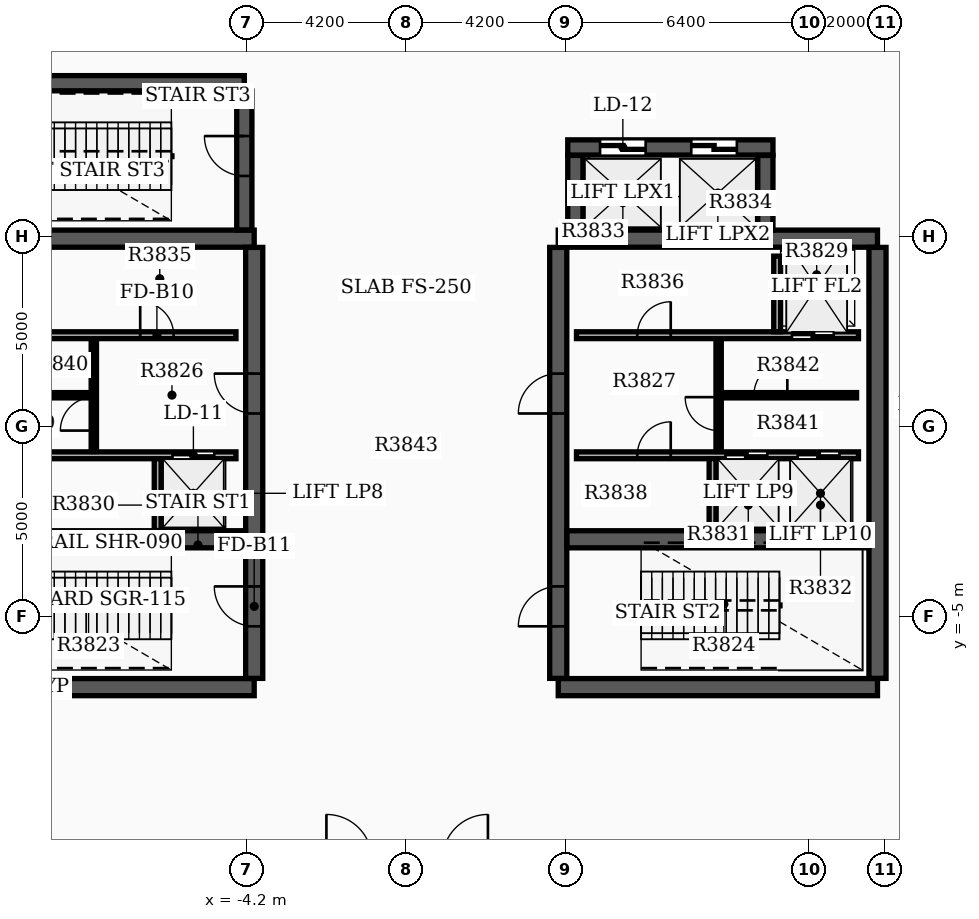
"""IFC4 building model, lengths in metres.
Left out: names, types, materials, properties, quantities, classifications, styles, units other than length and angle.
Written with IfcOpenShell. Run it as: python <this file> out.ifc"""

import sys

from ifc_helpers import new_model, si_unit, direction, frame, frame_2d, origin, place, context, subcontext, project, spatial, rectangle, extrude, element, fill, save


model = new_model("IFC4")
c1 = context("Model", 3, precision=1e-05, world=origin(), true_north=direction((0.0, 1.0)))
c2 = subcontext(c1, "Body", "Model", "MODEL_VIEW")
j1 = project(units=[si_unit("LENGTHUNIT", "METRE"), si_unit("PLANEANGLEUNIT", "RADIAN")], contexts=[c1])
p1 = place(None, origin())
s1 = spatial("IfcSite", under=j1, at=p1, CompositionType="ELEMENT")
p2 = place(p1, origin())
s2 = spatial("IfcBuilding", under=s1, at=p2, CompositionType="ELEMENT")
p3 = place(p2, frame((0.0, 0.0, 240.3)))
s3 = spatial("IfcBuildingStorey", under=s2, at=p3, CompositionType="ELEMENT", Elevation=240.3)
for number, where, z_axis, x_axis in (
    (1, (-12.4, -6.85, 0.0), (0.0, 0.0, 1.0), (1.0, 0.0, 0.0)),
    (2, (-12.4, 4.95, 0.0), (0.0, 0.0, 1.0), (1.0, 0.0, 0.0)),
):
    element("IfcWall", number, at=place(p3, frame(where, z_axis=z_axis, x_axis=x_axis)), inside=s3, PredefinedType="SHEAR", context=c2, shape_type="SweptSolid", body=[
        extrude(rectangle(XDim=8.4, YDim=0.45, at=frame_2d((4.2, 0.0))), origin(), (0.0, 0.0, 1.0), 4.85),
    ])
p4 = place(p3, frame((-4.0, -6.62, 0.0), z_axis=(0.0, 0.0, 1.0), x_axis=(0.0, 1.0, 0.0)))
e3 = element("IfcWall", 3, at=p4, inside=s3, PredefinedType="SHEAR", context=c2, shape_type="SweptSolid", body=[
    extrude(rectangle(XDim=11.34, YDim=0.45, at=frame_2d((5.67, 0.0))), origin(), (0.0, 0.0, 1.0), 4.85),
])
p5 = place(p4, frame((1.37, 0.0, 0.0)))
e4 = element("IfcOpeningElement", 4, at=p5, cuts=e3, PredefinedType="OPENING", context=c2, shape_type="SweptSolid", body=[
    extrude(rectangle(XDim=1.05, YDim=2.15, at=frame_2d((0.525, 1.075))), frame((0.0, 0.235, 0.0), z_axis=(0.0, -1.0, 0.0), x_axis=(1.0, 0.0, 0.0)), (0.0, 0.0, 1.0), 0.47),
])
p6 = place(p4, frame((6.97, 0.0, 0.0)))
e5 = element("IfcOpeningElement", 5, at=p6, cuts=e3, PredefinedType="OPENING", context=c2, shape_type="SweptSolid", body=[
    extrude(rectangle(XDim=1.05, YDim=2.15, at=frame_2d((0.525, 1.075))), frame((0.0, 0.235, 0.0), z_axis=(0.0, -1.0, 0.0), x_axis=(1.0, 0.0, 0.0)), (0.0, 0.0, 1.0), 0.47),
])
p7 = place(p3, frame((-12.17, -2.96, 0.0), z_axis=(0.0, 0.0, 1.0), x_axis=(1.0, 0.0, 0.0)))
e6 = element("IfcWall", 6, at=p7, inside=s3, PredefinedType="SHEAR", context=c2, shape_type="SweptSolid", body=[
    extrude(rectangle(XDim=7.94, YDim=0.45, at=frame_2d((3.97, 0.0))), origin(), (0.0, 0.0, 1.0), 4.85),
])
for number, where, z_axis, x_axis in (
    (7, (4.0, -6.85, 0.0), (0.0, 0.0, 1.0), (1.0, 0.0, 0.0)),
    (8, (4.0, 4.95, 0.0), (0.0, 0.0, 1.0), (1.0, 0.0, 0.0)),
):
    element("IfcWall", number, at=place(p3, frame(where, z_axis=z_axis, x_axis=x_axis)), inside=s3, PredefinedType="SHEAR", context=c2, shape_type="SweptSolid", body=[
        extrude(rectangle(XDim=8.4, YDim=0.45, at=frame_2d((4.2, 0.0))), origin(), (0.0, 0.0, 1.0), 4.85),
    ])
p8 = place(p3, frame((4.0, -6.62, 0.0), z_axis=(0.0, 0.0, 1.0), x_axis=(0.0, 1.0, 0.0)))
e9 = element("IfcWall", 9, at=p8, inside=s3, PredefinedType="SHEAR", context=c2, shape_type="SweptSolid", body=[
    extrude(rectangle(XDim=11.34, YDim=0.45, at=frame_2d((5.67, 0.0))), origin(), (0.0, 0.0, 1.0), 4.85),
])
p9 = place(p8, frame((1.37, 0.0, 0.0)))
e10 = element("IfcOpeningElement", 10, at=p9, cuts=e9, PredefinedType="OPENING", context=c2, shape_type="SweptSolid", body=[
    extrude(rectangle(XDim=1.05, YDim=2.15, at=frame_2d((0.525, 1.075))), frame((0.0, 0.235, 0.0), z_axis=(0.0, -1.0, 0.0), x_axis=(1.0, 0.0, 0.0)), (0.0, 0.0, 1.0), 0.47),
])
p10 = place(p8, frame((6.97, 0.0, 0.0)))
e11 = element("IfcOpeningElement", 11, at=p10, cuts=e9, PredefinedType="OPENING", context=c2, shape_type="SweptSolid", body=[
    extrude(rectangle(XDim=1.05, YDim=2.15, at=frame_2d((0.525, 1.075))), frame((0.0, 0.235, 0.0), z_axis=(0.0, -1.0, 0.0), x_axis=(1.0, 0.0, 0.0)), (0.0, 0.0, 1.0), 0.47),
])
p11 = place(p3, frame((12.4, -6.62, 0.0), z_axis=(0.0, 0.0, 1.0), x_axis=(0.0, 1.0, 0.0)))
e12 = element("IfcWall", 12, at=p11, inside=s3, PredefinedType="SHEAR", context=c2, shape_type="SweptSolid", body=[
    extrude(rectangle(XDim=11.34, YDim=0.45, at=frame_2d((5.67, 0.0))), origin(), (0.0, 0.0, 1.0), 4.85),
])
p12 = place(p3, frame((4.23, -2.96, 0.0), z_axis=(0.0, 0.0, 1.0), x_axis=(1.0, 0.0, 0.0)))
e13 = element("IfcWall", 13, at=p12, inside=s3, PredefinedType="SHEAR", context=c2, shape_type="SweptSolid", body=[
    extrude(rectangle(XDim=7.94, YDim=0.45, at=frame_2d((3.97, 0.0))), origin(), (0.0, 0.0, 1.0), 4.85),
])
p13 = place(p3, frame((-12.22, 9.04, 0.0), z_axis=(0.0, 0.0, 1.0), x_axis=(1.0, 0.0, 0.0)))
e14 = element("IfcWall", 14, at=p13, inside=s3, PredefinedType="SHEAR", context=c2, shape_type="SweptSolid", body=[
    extrude(rectangle(XDim=7.96, YDim=0.4, at=frame_2d((3.98, 0.0))), origin(), (0.0, 0.0, 1.0), 4.85),
])
p14 = place(p3, frame((-4.26, 5.18, 0.0), z_axis=(0.0, 0.0, 1.0), x_axis=(0.0, 1.0, 0.0)))
e15 = element("IfcWall", 15, at=p14, inside=s3, PredefinedType="SHEAR", context=c2, shape_type="SweptSolid", body=[
    extrude(rectangle(XDim=3.655, YDim=0.4, at=frame_2d((1.828, 0.0))), origin(), (0.0, 0.0, 1.0), 4.85),
])
p15 = place(p14, frame((1.42, 0.0, 0.0)))
e16 = element("IfcOpeningElement", 16, at=p15, cuts=e15, PredefinedType="OPENING", context=c2, shape_type="SweptSolid", body=[
    extrude(rectangle(XDim=1.05, YDim=2.15, at=frame_2d((0.525, 1.075))), frame((0.0, 0.21, 0.0), z_axis=(0.0, -1.0, 0.0), x_axis=(1.0, 0.0, 0.0)), (0.0, 0.0, 1.0), 0.42),
])
p16 = place(p3, frame((4.45, 5.18, 0.0), z_axis=(0.0, 0.0, 1.0), x_axis=(0.0, 1.0, 0.0)))
e17 = element("IfcWall", 17, at=p16, inside=s3, PredefinedType="SHEAR", context=c2, shape_type="SweptSolid", body=[
    extrude(rectangle(XDim=1.96, YDim=0.4, at=frame_2d((0.98, 0.0))), origin(), (0.0, 0.0, 1.0), 4.85),
])
p17 = place(p3, frame((4.25, 7.35, 0.0), z_axis=(0.0, 0.0, 1.0), x_axis=(1.0, 0.0, 0.0)))
e18 = element("IfcWall", 18, at=p17, inside=s3, PredefinedType="SHEAR", context=c2, shape_type="SweptSolid", body=[
    extrude(rectangle(XDim=5.4, YDim=0.4, at=frame_2d((2.7, 0.0))), origin(), (0.0, 0.0, 1.0), 4.85),
])
p18 = place(p17, frame((0.85, 0.0, 0.0)))
e19 = element("IfcOpeningElement", 19, at=p18, cuts=e18, PredefinedType="OPENING", context=c2, shape_type="SweptSolid", body=[
    extrude(rectangle(XDim=1.2, YDim=2.2, at=frame_2d((0.6, 1.1))), frame((0.0, 0.21, 0.0), z_axis=(0.0, -1.0, 0.0), x_axis=(1.0, 0.0, 0.0)), (0.0, 0.0, 1.0), 0.42),
])
p19 = place(p17, frame((3.25, 0.0, 0.0)))
e20 = element("IfcOpeningElement", 20, at=p19, cuts=e18, PredefinedType="OPENING", context=c2, shape_type="SweptSolid", body=[
    extrude(rectangle(XDim=1.2, YDim=2.2, at=frame_2d((0.6, 1.1))), frame((0.0, 0.21, 0.0), z_axis=(0.0, -1.0, 0.0), x_axis=(1.0, 0.0, 0.0)), (0.0, 0.0, 1.0), 0.42),
])
p20 = place(p3, frame((9.45, 5.18, 0.0), z_axis=(0.0, 0.0, 1.0), x_axis=(0.0, 1.0, 0.0)))
e21 = element("IfcWall", 21, at=p20, inside=s3, PredefinedType="SHEAR", context=c2, shape_type="SweptSolid", body=[
    extrude(rectangle(XDim=1.96, YDim=0.4, at=frame_2d((0.98, 0.0))), origin(), (0.0, 0.0, 1.0), 4.85),
])
p21 = place(p3, frame((-11.9, 2.41, 0.0), z_axis=(0.0, 0.0, 1.0), x_axis=(1.0, 0.0, 0.0)))
e22 = element("IfcWall", 22, at=p21, inside=s3, PredefinedType="SOLIDWALL", context=c2, shape_type="SweptSolid", body=[
    extrude(rectangle(XDim=7.42, YDim=0.18, at=frame_2d((3.71, 0.0))), origin(), (0.0, 0.0, 1.0), 3.92),
])
p22 = place(p21, frame((0.55, 0.0, 0.0)))
e23 = element("IfcOpeningElement", 23, at=p22, cuts=e22, PredefinedType="OPENING", context=c2, shape_type="SweptSolid", body=[
    extrude(rectangle(XDim=1.1, YDim=2.15, at=frame_2d((0.55, 1.075))), frame((0.0, 0.1, 0.0), z_axis=(0.0, -1.0, 0.0), x_axis=(1.0, 0.0, 0.0)), (0.0, 0.0, 1.0), 0.2),
])
p23 = place(p21, frame((4.9, 0.0, 0.0)))
e24 = element("IfcOpeningElement", 24, at=p23, cuts=e22, PredefinedType="OPENING", context=c2, shape_type="SweptSolid", body=[
    extrude(rectangle(XDim=0.88, YDim=2.1, at=frame_2d((0.44, 1.05))), frame((0.0, 0.1, 0.0), z_axis=(0.0, -1.0, 0.0), x_axis=(1.0, 0.0, 0.0)), (0.0, 0.0, 1.0), 0.2),
])
p24 = place(p3, frame((4.48, 2.41, 0.0), z_axis=(0.0, 0.0, 1.0), x_axis=(1.0, 0.0, 0.0)))
e25 = element("IfcWall", 25, at=p24, inside=s3, PredefinedType="SOLIDWALL", context=c2, shape_type="SweptSolid", body=[
    extrude(rectangle(XDim=7.42, YDim=0.18, at=frame_2d((3.71, 0.0))), origin(), (0.0, 0.0, 1.0), 3.92),
])
p25 = place(p24, frame((5.67, 0.0, 0.0)))
e26 = element("IfcOpeningElement", 26, at=p25, cuts=e25, PredefinedType="OPENING", context=c2, shape_type="SweptSolid", body=[
    extrude(rectangle(XDim=1.1, YDim=2.15, at=frame_2d((0.55, 1.075))), frame((0.0, 0.1, 0.0), z_axis=(0.0, -1.0, 0.0), x_axis=(1.0, 0.0, 0.0)), (0.0, 0.0, 1.0), 0.2),
])
p26 = place(p24, frame((1.6, 0.0, 0.0)))
e27 = element("IfcOpeningElement", 27, at=p26, cuts=e25, PredefinedType="OPENING", context=c2, shape_type="SweptSolid", body=[
    extrude(rectangle(XDim=0.88, YDim=2.1, at=frame_2d((0.44, 1.05))), frame((0.0, 0.1, 0.0), z_axis=(0.0, -1.0, 0.0), x_axis=(1.0, 0.0, 0.0)), (0.0, 0.0, 1.0), 0.2),
])
p27 = place(p3, frame((-11.9, -0.75, 0.0), z_axis=(0.0, 0.0, 1.0), x_axis=(1.0, 0.0, 0.0)))
e28 = element("IfcWall", 28, at=p27, inside=s3, PredefinedType="SOLIDWALL", context=c2, shape_type="SweptSolid", body=[
    extrude(rectangle(XDim=7.42, YDim=0.18, at=frame_2d((3.71, 0.0))), origin(), (0.0, 0.0, 1.0), 3.92),
])
p28 = place(p27, frame((5.75, 0.0, 0.0)))
e29 = element("IfcOpeningElement", 29, at=p28, cuts=e28, PredefinedType="OPENING", context=c2, shape_type="SweptSolid", body=[
    extrude(rectangle(XDim=1.1, YDim=2.15, at=frame_2d((0.55, 1.075))), frame((0.0, 0.1, 0.0), z_axis=(0.0, -1.0, 0.0), x_axis=(1.0, 0.0, 0.0)), (0.0, 0.0, 1.0), 0.2),
])
p29 = place(p27, frame((1.6, 0.0, 0.0)))
e30 = element("IfcOpeningElement", 30, at=p29, cuts=e28, PredefinedType="OPENING", context=c2, shape_type="SweptSolid", body=[
    extrude(rectangle(XDim=0.88, YDim=2.1, at=frame_2d((0.44, 1.05))), frame((0.0, 0.1, 0.0), z_axis=(0.0, -1.0, 0.0), x_axis=(1.0, 0.0, 0.0)), (0.0, 0.0, 1.0), 0.2),
])
p30 = place(p3, frame((4.48, -0.75, 0.0), z_axis=(0.0, 0.0, 1.0), x_axis=(1.0, 0.0, 0.0)))
e31 = element("IfcWall", 31, at=p30, inside=s3, PredefinedType="SOLIDWALL", context=c2, shape_type="SweptSolid", body=[
    extrude(rectangle(XDim=7.42, YDim=0.18, at=frame_2d((3.71, 0.0))), origin(), (0.0, 0.0, 1.0), 3.92),
])
p31 = place(p30, frame((3.92, 0.0, 0.0)))
e32 = element("IfcOpeningElement", 32, at=p31, cuts=e31, PredefinedType="OPENING", context=c2, shape_type="SweptSolid", body=[
    extrude(rectangle(XDim=1.1, YDim=2.15, at=frame_2d((0.55, 1.075))), frame((0.0, 0.1, 0.0), z_axis=(0.0, -1.0, 0.0), x_axis=(1.0, 0.0, 0.0)), (0.0, 0.0, 1.0), 0.2),
])
p32 = place(p30, frame((5.82, 0.0, 0.0)))
e33 = element("IfcOpeningElement", 33, at=p32, cuts=e31, PredefinedType="OPENING", context=c2, shape_type="SweptSolid", body=[
    extrude(rectangle(XDim=1.1, YDim=2.15, at=frame_2d((0.55, 1.075))), frame((0.0, 0.1, 0.0), z_axis=(0.0, -1.0, 0.0), x_axis=(1.0, 0.0, 0.0)), (0.0, 0.0, 1.0), 0.2),
])
p33 = place(p30, frame((1.6, 0.0, 0.0)))
e34 = element("IfcOpeningElement", 34, at=p33, cuts=e31, PredefinedType="OPENING", context=c2, shape_type="SweptSolid", body=[
    extrude(rectangle(XDim=0.88, YDim=2.1, at=frame_2d((0.44, 1.05))), frame((0.0, 0.1, 0.0), z_axis=(0.0, -1.0, 0.0), x_axis=(1.0, 0.0, 0.0)), (0.0, 0.0, 1.0), 0.2),
])
p34 = place(p3, frame((9.76, 2.5, 0.0), z_axis=(0.0, 0.0, 1.0), x_axis=(0.0, 1.0, 0.0)))
e35 = element("IfcWall", 35, at=p34, inside=s3, PredefinedType="SOLIDWALL", context=c2, shape_type="SweptSolid", body=[
    extrude(rectangle(XDim=1.99, YDim=0.18, at=frame_2d((0.995, 0.0))), origin(), (0.0, 0.0, 1.0), 3.92),
])
for number, where, z_axis, x_axis in (
    (36, (-6.54, -2.73, 0.0), (0.0, 0.0, 1.0), (0.0, 1.0, 0.0)),
    (37, (8.06, -2.73, 0.0), (0.0, 0.0, 1.0), (0.0, 1.0, 0.0)),
):
    element("IfcWall", number, at=place(p3, frame(where, z_axis=z_axis, x_axis=x_axis)), inside=s3, PredefinedType="SOLIDWALL", context=c2, shape_type="SweptSolid", body=[
        extrude(rectangle(XDim=1.89, YDim=0.18, at=frame_2d((0.945, 0.0))), origin(), (0.0, 0.0, 1.0), 3.92),
    ])
p35 = place(p3, frame((-8.22, -0.65, 0.0), z_axis=(0.0, 0.0, 1.0), x_axis=(0.0, 1.0, 0.0)))
e38 = element("IfcWall", 38, at=p35, inside=s3, PredefinedType="SOLIDWALL", context=c2, shape_type="SweptSolid", body=[
    extrude(rectangle(XDim=2.96, YDim=0.14, at=frame_2d((1.48, 0.0))), origin(), (0.0, 0.0, 1.0), 3.92),
])
p36 = place(p35, frame((0.55, 0.0, 0.0)))
e39 = element("IfcOpeningElement", 39, at=p36, cuts=e38, PredefinedType="OPENING", context=c2, shape_type="SweptSolid", body=[
    extrude(rectangle(XDim=0.88, YDim=2.1, at=frame_2d((0.44, 1.05))), frame((0.0, 0.08, 0.0), z_axis=(0.0, -1.0, 0.0), x_axis=(1.0, 0.0, 0.0)), (0.0, 0.0, 1.0), 0.16),
])
p37 = place(p3, frame((8.22, -0.65, 0.0), z_axis=(0.0, 0.0, 1.0), x_axis=(0.0, 1.0, 0.0)))
e40 = element("IfcWall", 40, at=p37, inside=s3, PredefinedType="SOLIDWALL", context=c2, shape_type="SweptSolid", body=[
    extrude(rectangle(XDim=2.96, YDim=0.14, at=frame_2d((1.48, 0.0))), origin(), (0.0, 0.0, 1.0), 3.92),
])
p38 = place(p37, frame((0.55, 0.0, 0.0)))
e41 = element("IfcOpeningElement", 41, at=p38, cuts=e40, PredefinedType="OPENING", context=c2, shape_type="SweptSolid", body=[
    extrude(rectangle(XDim=0.88, YDim=2.1, at=frame_2d((0.44, 1.05))), frame((0.0, 0.08, 0.0), z_axis=(0.0, -1.0, 0.0), x_axis=(1.0, 0.0, 0.0)), (0.0, 0.0, 1.0), 0.16),
])
p39 = place(p3, frame((-11.85, 0.83, 0.0), z_axis=(0.0, 0.0, 1.0), x_axis=(1.0, 0.0, 0.0)))
e42 = element("IfcWall", 42, at=p39, inside=s3, PredefinedType="PARTITIONING", context=c2, shape_type="SweptSolid", body=[
    extrude(rectangle(XDim=3.552, YDim=0.14, at=frame_2d((1.776, 0.0))), origin(), (0.0, 0.0, 1.0), 3.92),
])
p40 = place(p39, frame((0.85, 0.0, 0.0)))
e43 = element("IfcOpeningElement", 43, at=p40, cuts=e42, PredefinedType="OPENING", context=c2, shape_type="SweptSolid", body=[
    extrude(rectangle(XDim=0.88, YDim=2.1, at=frame_2d((0.44, 1.05))), frame((0.0, 0.08, 0.0), z_axis=(0.0, -1.0, 0.0), x_axis=(1.0, 0.0, 0.0)), (0.0, 0.0, 1.0), 0.16),
])
p41 = place(p3, frame((8.298, 0.83, 0.0), z_axis=(0.0, 0.0, 1.0), x_axis=(1.0, 0.0, 0.0)))
e44 = element("IfcWall", 44, at=p41, inside=s3, PredefinedType="PARTITIONING", context=c2, shape_type="SweptSolid", body=[
    extrude(rectangle(XDim=3.552, YDim=0.14, at=frame_2d((1.776, 0.0))), origin(), (0.0, 0.0, 1.0), 3.92),
])
p42 = place(p41, frame((0.85, 0.0, 0.0)))
e45 = element("IfcOpeningElement", 45, at=p42, cuts=e44, PredefinedType="OPENING", context=c2, shape_type="SweptSolid", body=[
    extrude(rectangle(XDim=0.88, YDim=2.1, at=frame_2d((0.44, 1.05))), frame((0.0, 0.08, 0.0), z_axis=(0.0, -1.0, 0.0), x_axis=(1.0, 0.0, 0.0)), (0.0, 0.0, 1.0), 0.16),
])
p43 = place(p5, origin())
e46 = element("IfcDoor", 46, at=p43, inside=s3, OperationType="SINGLE_SWING_RIGHT", PredefinedType="DOOR", context=c2, shape_type="SweptSolid", body=[
    extrude(rectangle(XDim=1.05, YDim=2.15, at=frame_2d((0.525, 1.075))), frame((0.0, 0.025, 0.0), z_axis=(0.0, -1.0, 0.0), x_axis=(1.0, 0.0, 0.0)), (0.0, 0.0, 1.0), 0.05),
])
fill(e4, e46)
p44 = place(p9, origin())
e47 = element("IfcDoor", 47, at=p44, inside=s3, OperationType="SINGLE_SWING_LEFT", PredefinedType="DOOR", context=c2, shape_type="SweptSolid", body=[
    extrude(rectangle(XDim=1.05, YDim=2.15, at=frame_2d((0.525, 1.075))), frame((0.0, 0.025, 0.0), z_axis=(0.0, -1.0, 0.0), x_axis=(1.0, 0.0, 0.0)), (0.0, 0.0, 1.0), 0.05),
])
fill(e10, e47)
p45 = place(p6, origin())
e48 = element("IfcDoor", 48, at=p45, inside=s3, OperationType="SINGLE_SWING_RIGHT", PredefinedType="DOOR", context=c2, shape_type="SweptSolid", body=[
    extrude(rectangle(XDim=1.05, YDim=2.15, at=frame_2d((0.525, 1.075))), frame((0.0, 0.025, 0.0), z_axis=(0.0, -1.0, 0.0), x_axis=(1.0, 0.0, 0.0)), (0.0, 0.0, 1.0), 0.05),
])
fill(e5, e48)
p46 = place(p10, origin())
e49 = element("IfcDoor", 49, at=p46, inside=s3, OperationType="SINGLE_SWING_LEFT", PredefinedType="DOOR", context=c2, shape_type="SweptSolid", body=[
    extrude(rectangle(XDim=1.05, YDim=2.15, at=frame_2d((0.525, 1.075))), frame((0.0, 0.025, 0.0), z_axis=(0.0, -1.0, 0.0), x_axis=(1.0, 0.0, 0.0)), (0.0, 0.0, 1.0), 0.05),
])
fill(e11, e49)
p47 = place(p15, origin())
e50 = element("IfcDoor", 50, at=p47, inside=s3, OperationType="SINGLE_SWING_RIGHT", PredefinedType="DOOR", context=c2, shape_type="SweptSolid", body=[
    extrude(rectangle(XDim=1.05, YDim=2.15, at=frame_2d((0.525, 1.075))), frame((0.0, 0.025, 0.0), z_axis=(0.0, -1.0, 0.0), x_axis=(1.0, 0.0, 0.0)), (0.0, 0.0, 1.0), 0.05),
])
fill(e16, e50)
p48 = place(p25, origin())
e51 = element("IfcDoor", 51, at=p48, inside=s3, OperationType="DOUBLE_DOOR_SLIDING", PredefinedType="DOOR", context=c2, shape_type="SweptSolid", body=[
    extrude(rectangle(XDim=1.1, YDim=2.15, at=frame_2d((0.55, 1.075))), frame((0.0, 0.025, 0.0), z_axis=(0.0, -1.0, 0.0), x_axis=(1.0, 0.0, 0.0)), (0.0, 0.0, 1.0), 0.05),
])
fill(e26, e51)
p49 = place(p28, origin())
e52 = element("IfcDoor", 52, at=p49, inside=s3, OperationType="DOUBLE_DOOR_SLIDING", PredefinedType="DOOR", context=c2, shape_type="SweptSolid", body=[
    extrude(rectangle(XDim=1.1, YDim=2.15, at=frame_2d((0.55, 1.075))), frame((0.0, 0.025, 0.0), z_axis=(0.0, -1.0, 0.0), x_axis=(1.0, 0.0, 0.0)), (0.0, 0.0, 1.0), 0.05),
])
fill(e29, e52)
p50 = place(p31, origin())
e53 = element("IfcDoor", 53, at=p50, inside=s3, OperationType="DOUBLE_DOOR_SLIDING", PredefinedType="DOOR", context=c2, shape_type="SweptSolid", body=[
    extrude(rectangle(XDim=1.1, YDim=2.15, at=frame_2d((0.55, 1.075))), frame((0.0, 0.025, 0.0), z_axis=(0.0, -1.0, 0.0), x_axis=(1.0, 0.0, 0.0)), (0.0, 0.0, 1.0), 0.05),
])
fill(e32, e53)
p51 = place(p32, origin())
e54 = element("IfcDoor", 54, at=p51, inside=s3, OperationType="DOUBLE_DOOR_SLIDING", PredefinedType="DOOR", context=c2, shape_type="SweptSolid", body=[
    extrude(rectangle(XDim=1.1, YDim=2.15, at=frame_2d((0.55, 1.075))), frame((0.0, 0.025, 0.0), z_axis=(0.0, -1.0, 0.0), x_axis=(1.0, 0.0, 0.0)), (0.0, 0.0, 1.0), 0.05),
])
fill(e33, e54)
p52 = place(p18, origin())
e55 = element("IfcDoor", 55, at=p52, inside=s3, OperationType="DOUBLE_DOOR_SLIDING", PredefinedType="DOOR", context=c2, shape_type="SweptSolid", body=[
    extrude(rectangle(XDim=1.2, YDim=2.2, at=frame_2d((0.6, 1.1))), frame((0.0, 0.025, 0.0), z_axis=(0.0, -1.0, 0.0), x_axis=(1.0, 0.0, 0.0)), (0.0, 0.0, 1.0), 0.05),
])
fill(e19, e55)
p53 = place(p19, origin())
e56 = element("IfcDoor", 56, at=p53, inside=s3, OperationType="DOUBLE_DOOR_SLIDING", PredefinedType="DOOR", context=c2, shape_type="SweptSolid", body=[
    extrude(rectangle(XDim=1.2, YDim=2.2, at=frame_2d((0.6, 1.1))), frame((0.0, 0.025, 0.0), z_axis=(0.0, -1.0, 0.0), x_axis=(1.0, 0.0, 0.0)), (0.0, 0.0, 1.0), 0.05),
])
fill(e20, e56)
p54 = place(p23, origin())
e57 = element("IfcDoor", 57, at=p54, inside=s3, OperationType="SINGLE_SWING_LEFT", PredefinedType="DOOR", context=c2, shape_type="SweptSolid", body=[
    extrude(rectangle(XDim=0.88, YDim=2.1, at=frame_2d((0.44, 1.05))), frame((0.0, 0.025, 0.0), z_axis=(0.0, -1.0, 0.0), x_axis=(1.0, 0.0, 0.0)), (0.0, 0.0, 1.0), 0.05),
])
fill(e24, e57)
p55 = place(p26, origin())
e58 = element("IfcDoor", 58, at=p55, inside=s3, OperationType="SINGLE_SWING_RIGHT", PredefinedType="DOOR", context=c2, shape_type="SweptSolid", body=[
    extrude(rectangle(XDim=0.88, YDim=2.1, at=frame_2d((0.44, 1.05))), frame((0.0, 0.025, 0.0), z_axis=(0.0, -1.0, 0.0), x_axis=(1.0, 0.0, 0.0)), (0.0, 0.0, 1.0), 0.05),
])
fill(e27, e58)
p56 = place(p33, origin())
e59 = element("IfcDoor", 59, at=p56, inside=s3, OperationType="SINGLE_SWING_RIGHT", PredefinedType="DOOR", context=c2, shape_type="SweptSolid", body=[
    extrude(rectangle(XDim=0.88, YDim=2.1, at=frame_2d((0.44, 1.05))), frame((0.0, 0.025, 0.0), z_axis=(0.0, -1.0, 0.0), x_axis=(1.0, 0.0, 0.0)), (0.0, 0.0, 1.0), 0.05),
])
fill(e34, e59)
p57 = place(p36, origin())
e60 = element("IfcDoor", 60, at=p57, inside=s3, OperationType="SINGLE_SWING_LEFT", PredefinedType="DOOR", context=c2, shape_type="SweptSolid", body=[
    extrude(rectangle(XDim=0.88, YDim=2.1, at=frame_2d((0.44, 1.05))), frame((0.0, 0.025, 0.0), z_axis=(0.0, -1.0, 0.0), x_axis=(1.0, 0.0, 0.0)), (0.0, 0.0, 1.0), 0.05),
])
fill(e39, e60)
p58 = place(p38, origin())
e61 = element("IfcDoor", 61, at=p58, inside=s3, OperationType="SINGLE_SWING_RIGHT", PredefinedType="DOOR", context=c2, shape_type="SweptSolid", body=[
    extrude(rectangle(XDim=0.88, YDim=2.1, at=frame_2d((0.44, 1.05))), frame((0.0, 0.025, 0.0), z_axis=(0.0, -1.0, 0.0), x_axis=(1.0, 0.0, 0.0)), (0.0, 0.0, 1.0), 0.05),
])
fill(e41, e61)
p59 = place(p42, origin())
e62 = element("IfcDoor", 62, at=p59, inside=s3, OperationType="SINGLE_SWING_RIGHT", PredefinedType="DOOR", context=c2, shape_type="SweptSolid", body=[
    extrude(rectangle(XDim=0.88, YDim=2.1, at=frame_2d((0.44, 1.05))), frame((0.0, 0.025, 0.0), z_axis=(0.0, -1.0, 0.0), x_axis=(1.0, 0.0, 0.0)), (0.0, 0.0, 1.0), 0.05),
])
fill(e45, e62)
save(model, sys.argv[1])
